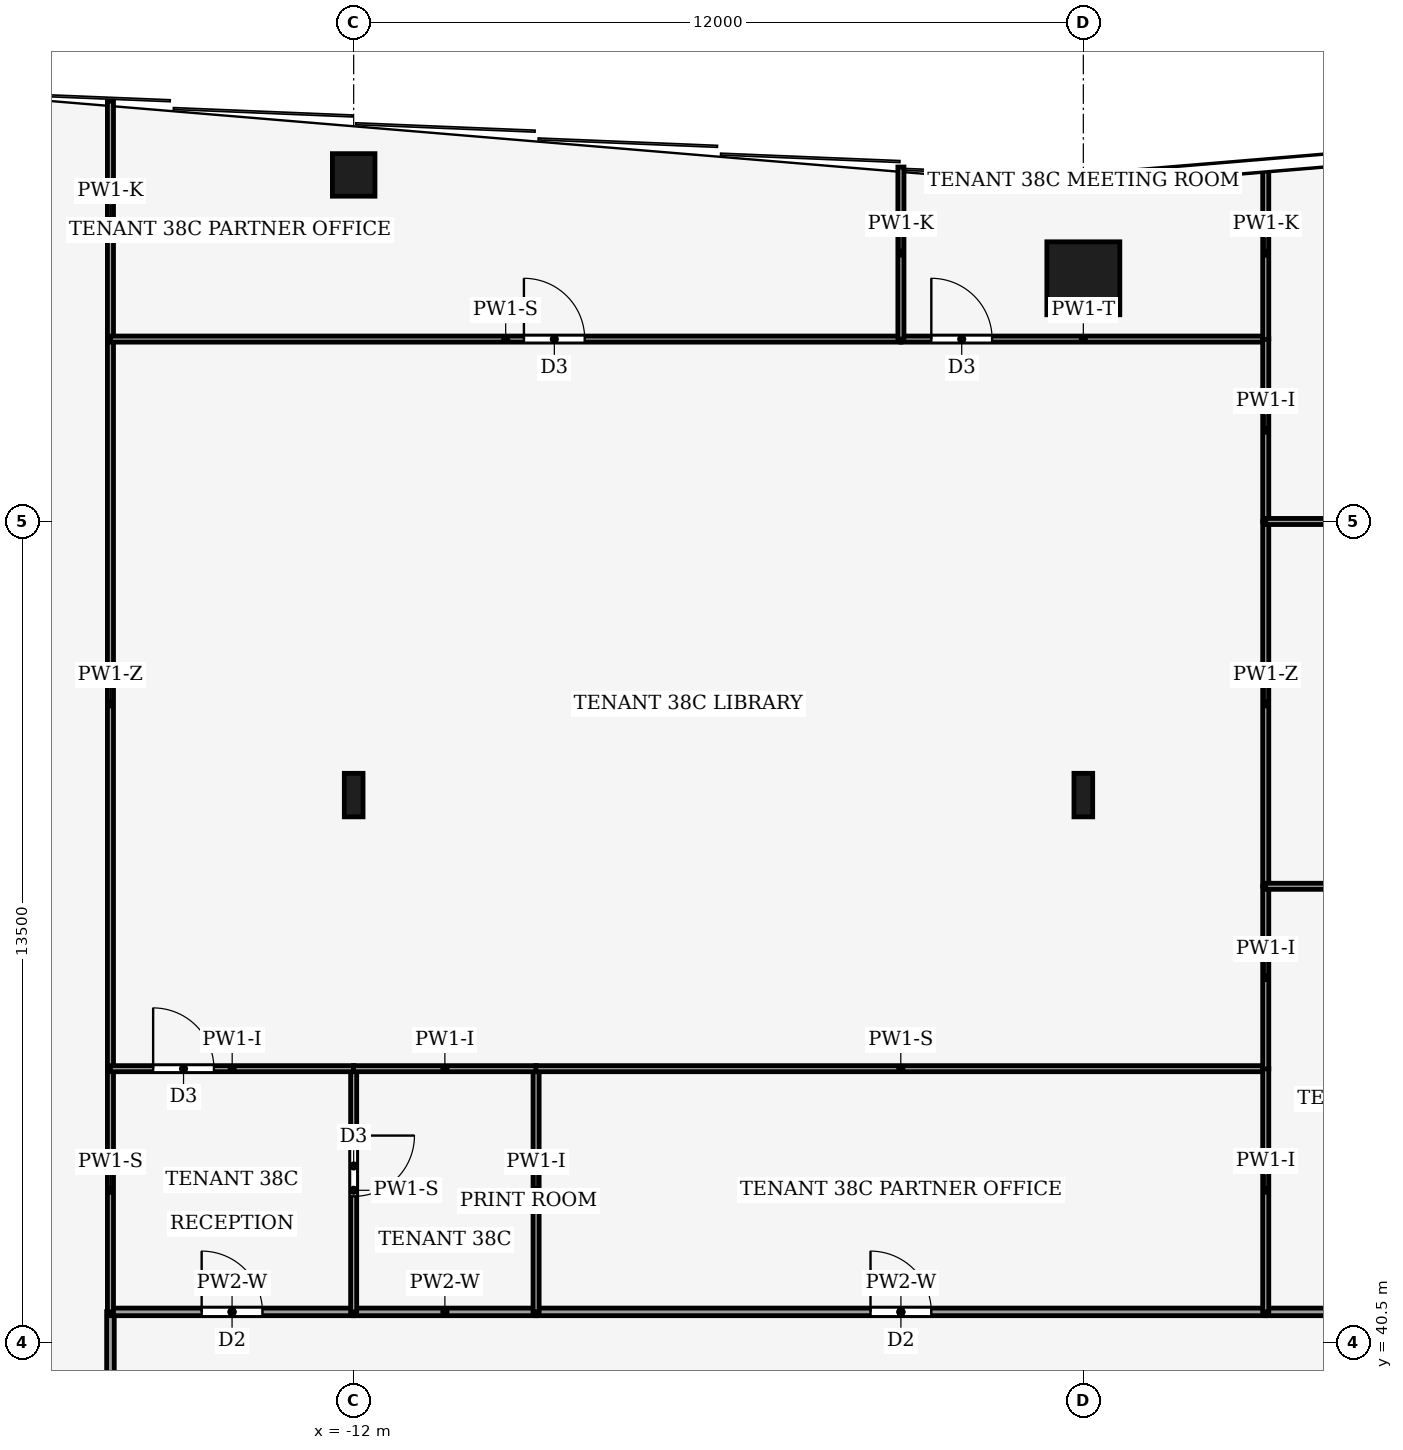
"""IFC4 building model, lengths in metres.
Left out: names, types, materials, properties, quantities, classifications, styles, units other than length and angle.
Written with IfcOpenShell. Run it as: python <this file> out.ifc"""

import sys

from ifc_helpers import new_model, si_unit, direction, frame, frame_2d, origin, origin_2d, place, context, subcontext, project, spatial, rectangle, hollow_rectangle, i_section, extrude, element, fill, save


model = new_model("IFC4")
c1 = context("Model", 3, precision=1e-05, world=origin(), true_north=direction((0.0, 1.0)))
c2 = subcontext(c1, "Body", "Model", "MODEL_VIEW")
j1 = project(units=[si_unit("LENGTHUNIT", "METRE"), si_unit("PLANEANGLEUNIT", "RADIAN")], contexts=[c1])
p1 = place(None, origin())
s1 = spatial("IfcSite", under=j1, at=p1, CompositionType="ELEMENT")
p2 = place(p1, origin())
s2 = spatial("IfcBuilding", under=s1, at=p2, CompositionType="ELEMENT")
p3 = place(p2, frame((0.0, 0.0, 166.0)))
s3 = spatial("IfcBuildingStorey", under=s2, at=p3, CompositionType="ELEMENT", Elevation=166.0)
p4 = place(p3, frame((0.0, 58.0, 0.0), z_axis=(0.0, 0.0, 1.0), x_axis=(1.0, 0.0, 0.0)))
e1 = element("IfcColumn", 1, at=p4, inside=s3, PredefinedType="COLUMN", context=c2, shape_type="SweptSolid", body=[
    extrude(hollow_rectangle(XDim=1.2, YDim=1.2, WallThickness=0.07, at=origin_2d()), origin(), (0.0, 0.0, 1.0), 4.0),
])
p5 = place(p3, frame((-12.0, 59.7, 0.0), z_axis=(0.0, 0.0, 1.0), x_axis=(1.0, 0.0, 0.0)))
e2 = element("IfcColumn", 2, at=p5, inside=s3, PredefinedType="COLUMN", context=c2, shape_type="SweptSolid", body=[
    extrude(hollow_rectangle(XDim=0.7, YDim=0.7, WallThickness=0.03, at=origin_2d()), origin(), (0.0, 0.0, 1.0), 4.0),
])
for number, where, z_axis, x_axis in (
    (3, (-12.0, 49.5, 0.0), (0.0, 0.0, 1.0), (1.0, 0.0, 0.0)),
    (4, (0.0, 49.5, 0.0), (0.0, 0.0, 1.0), (1.0, 0.0, 0.0)),
):
    element("IfcColumn", number, at=place(p3, frame(where, z_axis=z_axis, x_axis=x_axis)), inside=s3, PredefinedType="COLUMN", context=c2, shape_type="SweptSolid", body=[
        extrude(i_section(OverallWidth=0.308, OverallDepth=0.716, WebThickness=0.021, FlangeThickness=0.04, FilletRadius=0.027, at=origin_2d()), origin(), (0.0, 0.0, 1.0), 4.0),
    ])
p6 = place(p3, frame((-16.0, 36.0, 0.0), z_axis=(0.0, 0.0, 1.0), x_axis=(0.0, 1.0, 0.0)))
e5 = element("IfcWall", 5, at=p6, inside=s3, PredefinedType="PARTITIONING", context=c2, shape_type="SweptSolid", body=[
    extrude(rectangle(XDim=5.004, YDim=0.125, at=frame_2d((2.502, 0.0))), origin(), (0.0, 0.0, 1.0), 3.02),
])
p7 = place(p6, frame((2.002, 0.0, 0.0)))
e6 = element("IfcOpeningElement", 6, at=p7, cuts=e5, PredefinedType="OPENING", context=c2, shape_type="SweptSolid", body=[
    extrude(rectangle(XDim=1.0, YDim=2.1, at=frame_2d((0.5, 1.05))), frame((0.0, 0.073, 0.0), z_axis=(0.0, -1.0, 0.0), x_axis=(1.0, 0.0, 0.0)), (0.0, 0.0, 1.0), 0.145),
])
p8 = place(p3, frame((-16.0, 41.0, 0.0), z_axis=(0.0, 0.0, 1.0), x_axis=(1.0, 0.0, 0.0)))
e7 = element("IfcWall", 7, at=p8, inside=s3, PredefinedType="PARTITIONING", context=c2, shape_type="SweptSolid", body=[
    extrude(rectangle(XDim=4.0, YDim=0.125, at=frame_2d((2.0, 0.0))), origin(), (0.0, 0.0, 1.0), 3.32),
])
p9 = place(p8, frame((1.5, 0.0, 0.0)))
e8 = element("IfcOpeningElement", 8, at=p9, cuts=e7, PredefinedType="OPENING", context=c2, shape_type="SweptSolid", body=[
    extrude(rectangle(XDim=1.0, YDim=2.1, at=frame_2d((0.5, 1.05))), frame((0.0, 0.073, 0.0), z_axis=(0.0, -1.0, 0.0), x_axis=(1.0, 0.0, 0.0)), (0.0, 0.0, 1.0), 0.145),
])
p10 = place(p3, frame((-9.0, 41.0, 0.0), z_axis=(0.0, 0.0, 1.0), x_axis=(-1.0, 0.0, 0.0)))
e9 = element("IfcWall", 9, at=p10, inside=s3, PredefinedType="PARTITIONING", context=c2, shape_type="SweptSolid", body=[
    extrude(rectangle(XDim=3.0, YDim=0.125, at=frame_2d((1.5, 0.0))), origin(), (0.0, 0.0, 1.0), 3.32),
])
p11 = place(p3, frame((-9.0, 41.0, 0.0), z_axis=(0.0, 0.0, 1.0), x_axis=(1.0, 0.0, 0.0)))
e10 = element("IfcWall", 10, at=p11, inside=s3, PredefinedType="PARTITIONING", context=c2, shape_type="SweptSolid", body=[
    extrude(rectangle(XDim=12.0, YDim=0.125, at=frame_2d((6.0, 0.0))), origin(), (0.0, 0.0, 1.0), 3.32),
])
p12 = place(p11, frame((5.5, 0.0, 0.0)))
e11 = element("IfcOpeningElement", 11, at=p12, cuts=e10, PredefinedType="OPENING", context=c2, shape_type="SweptSolid", body=[
    extrude(rectangle(XDim=1.0, YDim=2.1, at=frame_2d((0.5, 1.05))), frame((0.0, 0.073, 0.0), z_axis=(0.0, -1.0, 0.0), x_axis=(1.0, 0.0, 0.0)), (0.0, 0.0, 1.0), 0.145),
])
p13 = place(p3, frame((3.0, 41.0, 0.0), z_axis=(0.0, 0.0, 1.0), x_axis=(1.0, 0.0, 0.0)))
e12 = element("IfcWall", 12, at=p13, inside=s3, PredefinedType="PARTITIONING", context=c2, shape_type="SweptSolid", body=[
    extrude(rectangle(XDim=6.0, YDim=0.125, at=frame_2d((3.0, 0.0))), origin(), (0.0, 0.0, 1.0), 3.32),
])
p14 = place(p13, frame((2.5, 0.0, 0.0)))
e13 = element("IfcOpeningElement", 13, at=p14, cuts=e12, PredefinedType="OPENING", context=c2, shape_type="SweptSolid", body=[
    extrude(rectangle(XDim=1.0, YDim=2.1, at=frame_2d((0.5, 1.05))), frame((0.0, 0.073, 0.0), z_axis=(0.0, -1.0, 0.0), x_axis=(1.0, 0.0, 0.0)), (0.0, 0.0, 1.0), 0.145),
])
p15 = place(p3, frame((-16.0, 41.0, 0.0), z_axis=(0.0, 0.0, 1.0), x_axis=(0.0, 1.0, 0.0)))
e14 = element("IfcWall", 14, at=p15, inside=s3, PredefinedType="PARTITIONING", context=c2, shape_type="SweptSolid", body=[
    extrude(rectangle(XDim=4.0, YDim=0.1, at=frame_2d((2.0, 0.0))), origin(), (0.0, 0.0, 1.0), 3.32),
])
p16 = place(p3, frame((-16.0, 45.0, 0.0), z_axis=(0.0, 0.0, 1.0), x_axis=(0.0, 1.0, 0.0)))
e15 = element("IfcWall", 15, at=p16, inside=s3, PredefinedType="PARTITIONING", context=c2, shape_type="SweptSolid", body=[
    extrude(rectangle(XDim=12.0, YDim=0.1, at=frame_2d((6.0, 0.0))), origin(), (0.0, 0.0, 1.0), 3.12),
])
p17 = place(p3, frame((-16.0, 57.0, 0.0), z_axis=(0.0, 0.0, 1.0), x_axis=(0.0, 1.0, 0.0)))
e16 = element("IfcWall", 16, at=p17, inside=s3, PredefinedType="PARTITIONING", context=c2, shape_type="SweptSolid", body=[
    extrude(rectangle(XDim=3.913, YDim=0.1, at=frame_2d((1.957, 0.0))), origin(), (0.0, 0.0, 1.0), 2.92),
])
p18 = place(p3, frame((-12.0, 45.0, 0.0), z_axis=(0.0, 0.0, 1.0), x_axis=(0.0, -1.0, 0.0)))
e17 = element("IfcWall", 17, at=p18, inside=s3, PredefinedType="PARTITIONING", context=c2, shape_type="SweptSolid", body=[
    extrude(rectangle(XDim=4.0, YDim=0.1, at=frame_2d((2.0, 0.0))), origin(), (0.0, 0.0, 1.0), 3.32),
])
p19 = place(p18, frame((1.1, 0.0, 0.0)))
e18 = element("IfcOpeningElement", 18, at=p19, cuts=e17, PredefinedType="OPENING", context=c2, shape_type="SweptSolid", body=[
    extrude(rectangle(XDim=1.0, YDim=2.1, at=frame_2d((0.5, 1.05))), frame((0.0, 0.06, 0.0), z_axis=(0.0, -1.0, 0.0), x_axis=(1.0, 0.0, 0.0)), (0.0, 0.0, 1.0), 0.12),
])
p20 = place(p3, frame((-16.0, 45.0, 0.0), z_axis=(0.0, 0.0, 1.0), x_axis=(1.0, 0.0, 0.0)))
e19 = element("IfcWall", 19, at=p20, inside=s3, PredefinedType="PARTITIONING", context=c2, shape_type="SweptSolid", body=[
    extrude(rectangle(XDim=4.004, YDim=0.1, at=frame_2d((2.002, 0.0))), origin(), (0.0, 0.0, 1.0), 3.75),
])
p21 = place(p20, frame((0.702, 0.0, 0.0)))
e20 = element("IfcOpeningElement", 20, at=p21, cuts=e19, PredefinedType="OPENING", context=c2, shape_type="SweptSolid", body=[
    extrude(rectangle(XDim=1.0, YDim=2.1, at=frame_2d((0.5, 1.05))), frame((0.0, 0.06, 0.0), z_axis=(0.0, -1.0, 0.0), x_axis=(1.0, 0.0, 0.0)), (0.0, 0.0, 1.0), 0.12),
])
p22 = place(p3, frame((-9.0, 41.0, 0.0), z_axis=(0.0, 0.0, 1.0), x_axis=(0.0, 1.0, 0.0)))
e21 = element("IfcWall", 21, at=p22, inside=s3, PredefinedType="PARTITIONING", context=c2, shape_type="SweptSolid", body=[
    extrude(rectangle(XDim=4.0, YDim=0.1, at=frame_2d((2.0, 0.0))), origin(), (0.0, 0.0, 1.0), 3.75),
])
p23 = place(p3, frame((-8.996, 45.0, 0.0), z_axis=(0.0, 0.0, 1.0), x_axis=(-1.0, 0.0, 0.0)))
e22 = element("IfcWall", 22, at=p23, inside=s3, PredefinedType="PARTITIONING", context=c2, shape_type="SweptSolid", body=[
    extrude(rectangle(XDim=3.008, YDim=0.1, at=frame_2d((1.504, 0.0))), origin(), (0.0, 0.0, 1.0), 3.75),
])
p24 = place(p3, frame((3.0, 45.0, 0.0), z_axis=(0.0, 0.0, 1.0), x_axis=(-1.0, 0.0, 0.0)))
e23 = element("IfcWall", 23, at=p24, inside=s3, PredefinedType="PARTITIONING", context=c2, shape_type="SweptSolid", body=[
    extrude(rectangle(XDim=12.004, YDim=0.1, at=frame_2d((6.002, 0.0))), origin(), (0.0, 0.0, 1.0), 3.32),
])
p25 = place(p3, frame((3.0, 41.0, 0.0), z_axis=(0.0, 0.0, 1.0), x_axis=(0.0, 1.0, 0.0)))
e24 = element("IfcWall", 24, at=p25, inside=s3, PredefinedType="PARTITIONING", context=c2, shape_type="SweptSolid", body=[
    extrude(rectangle(XDim=4.004, YDim=0.1, at=frame_2d((2.002, 0.0))), origin(), (0.0, 0.0, 1.0), 3.75),
])
p26 = place(p3, frame((-16.0, 57.0, 0.0), z_axis=(0.0, 0.0, 1.0), x_axis=(1.0, 0.0, 0.0)))
e25 = element("IfcWall", 25, at=p26, inside=s3, PredefinedType="PARTITIONING", context=c2, shape_type="SweptSolid", body=[
    extrude(rectangle(XDim=13.0, YDim=0.1, at=frame_2d((6.5, 0.0))), origin(), (0.0, 0.0, 1.0), 3.32),
])
p27 = place(p26, frame((6.8, 0.0, 0.0)))
e26 = element("IfcOpeningElement", 26, at=p27, cuts=e25, PredefinedType="OPENING", context=c2, shape_type="SweptSolid", body=[
    extrude(rectangle(XDim=1.0, YDim=2.1, at=frame_2d((0.5, 1.05))), frame((0.0, 0.06, 0.0), z_axis=(0.0, -1.0, 0.0), x_axis=(1.0, 0.0, 0.0)), (0.0, 0.0, 1.0), 0.12),
])
p28 = place(p3, frame((-3.0, 57.0, 0.0), z_axis=(0.0, 0.0, 1.0), x_axis=(1.0, 0.0, 0.0)))
e27 = element("IfcWall", 27, at=p28, inside=s3, PredefinedType="PARTITIONING", context=c2, shape_type="SweptSolid", body=[
    extrude(rectangle(XDim=6.0, YDim=0.1, at=frame_2d((3.0, 0.0))), origin(), (0.0, 0.0, 1.0), 3.36),
])
p29 = place(p28, frame((0.5, 0.0, 0.0)))
e28 = element("IfcOpeningElement", 28, at=p29, cuts=e27, PredefinedType="OPENING", context=c2, shape_type="SweptSolid", body=[
    extrude(rectangle(XDim=1.0, YDim=2.1, at=frame_2d((0.5, 1.05))), frame((0.0, 0.06, 0.0), z_axis=(0.0, -1.0, 0.0), x_axis=(1.0, 0.0, 0.0)), (0.0, 0.0, 1.0), 0.12),
])
p30 = place(p3, frame((3.0, 44.996, 0.0), z_axis=(0.0, 0.0, 1.0), x_axis=(0.0, 1.0, 0.0)))
e29 = element("IfcWall", 29, at=p30, inside=s3, PredefinedType="PARTITIONING", context=c2, shape_type="SweptSolid", body=[
    extrude(rectangle(XDim=3.004, YDim=0.1, at=frame_2d((1.502, 0.0))), origin(), (0.0, 0.0, 1.0), 3.75),
])
p31 = place(p3, frame((3.0, 48.0, 0.0), z_axis=(0.0, 0.0, 1.0), x_axis=(0.0, 1.0, 0.0)))
e30 = element("IfcWall", 30, at=p31, inside=s3, PredefinedType="PARTITIONING", context=c2, shape_type="SweptSolid", body=[
    extrude(rectangle(XDim=6.0, YDim=0.1, at=frame_2d((3.0, 0.0))), origin(), (0.0, 0.0, 1.0), 3.12),
])
p32 = place(p3, frame((3.0, 54.0, 0.0), z_axis=(0.0, 0.0, 1.0), x_axis=(0.0, 1.0, 0.0)))
e31 = element("IfcWall", 31, at=p32, inside=s3, PredefinedType="PARTITIONING", context=c2, shape_type="SweptSolid", body=[
    extrude(rectangle(XDim=3.004, YDim=0.1, at=frame_2d((1.502, 0.0))), origin(), (0.0, 0.0, 1.0), 3.75),
])
p33 = place(p3, frame((-3.0, 57.0, 0.0), z_axis=(0.0, 0.0, 1.0), x_axis=(0.0, 1.0, 0.0)))
e32 = element("IfcWall", 32, at=p33, inside=s3, PredefinedType="PARTITIONING", context=c2, shape_type="SweptSolid", body=[
    extrude(rectangle(XDim=2.83, YDim=0.1, at=frame_2d((1.415, 0.0))), origin(), (0.0, 0.0, 1.0), 2.92),
])
p34 = place(p3, frame((3.0, 56.996, 0.0), z_axis=(0.0, 0.0, 1.0), x_axis=(0.0, 1.0, 0.0)))
e33 = element("IfcWall", 33, at=p34, inside=s3, PredefinedType="PARTITIONING", context=c2, shape_type="SweptSolid", body=[
    extrude(rectangle(XDim=2.834, YDim=0.1, at=frame_2d((1.417, 0.0))), origin(), (0.0, 0.0, 1.0), 2.92),
])
p35 = place(p3, frame((3.0, 48.0, 0.0), z_axis=(0.0, 0.0, 1.0), x_axis=(1.0, 0.0, 0.0)))
e34 = element("IfcWall", 34, at=p35, inside=s3, PredefinedType="PARTITIONING", context=c2, shape_type="SweptSolid", body=[
    extrude(rectangle(XDim=6.004, YDim=0.1, at=frame_2d((3.002, 0.0))), origin(), (0.0, 0.0, 1.0), 3.32),
])
p36 = place(p35, frame((2.502, 0.0, 0.0)))
e35 = element("IfcOpeningElement", 35, at=p36, cuts=e34, PredefinedType="OPENING", context=c2, shape_type="SweptSolid", body=[
    extrude(rectangle(XDim=1.0, YDim=2.1, at=frame_2d((0.5, 1.05))), frame((0.0, 0.06, 0.0), z_axis=(0.0, -1.0, 0.0), x_axis=(1.0, 0.0, 0.0)), (0.0, 0.0, 1.0), 0.12),
])
p37 = place(p3, frame((3.0, 54.0, 0.0), z_axis=(0.0, 0.0, 1.0), x_axis=(1.0, 0.0, 0.0)))
e36 = element("IfcWall", 36, at=p37, inside=s3, PredefinedType="PARTITIONING", context=c2, shape_type="SweptSolid", body=[
    extrude(rectangle(XDim=9.0, YDim=0.1, at=frame_2d((4.5, 0.0))), origin(), (0.0, 0.0, 1.0), 3.32),
])
p38 = place(p37, frame((4.0, 0.0, 0.0)))
e37 = element("IfcOpeningElement", 37, at=p38, cuts=e36, PredefinedType="OPENING", context=c2, shape_type="SweptSolid", body=[
    extrude(rectangle(XDim=1.0, YDim=2.1, at=frame_2d((0.5, 1.05))), frame((0.0, 0.06, 0.0), z_axis=(0.0, -1.0, 0.0), x_axis=(1.0, 0.0, 0.0)), (0.0, 0.0, 1.0), 0.12),
])
p39 = place(p9, origin())
e38 = element("IfcDoor", 38, at=p39, inside=s3, OperationType="SINGLE_SWING_LEFT", PredefinedType="DOOR", context=c2, shape_type="SweptSolid", body=[
    extrude(rectangle(XDim=1.0, YDim=2.1, at=frame_2d((0.5, 1.05))), frame((0.0, 0.025, 0.0), z_axis=(0.0, -1.0, 0.0), x_axis=(1.0, 0.0, 0.0)), (0.0, 0.0, 1.0), 0.05),
])
fill(e8, e38)
p40 = place(p12, origin())
e39 = element("IfcDoor", 39, at=p40, inside=s3, OperationType="SINGLE_SWING_RIGHT", PredefinedType="DOOR", context=c2, shape_type="SweptSolid", body=[
    extrude(rectangle(XDim=1.0, YDim=2.1, at=frame_2d((0.5, 1.05))), frame((0.0, 0.025, 0.0), z_axis=(0.0, -1.0, 0.0), x_axis=(1.0, 0.0, 0.0)), (0.0, 0.0, 1.0), 0.05),
])
fill(e11, e39)
p41 = place(p19, origin())
e40 = element("IfcDoor", 40, at=p41, inside=s3, OperationType="SINGLE_SWING_LEFT", PredefinedType="DOOR", context=c2, shape_type="SweptSolid", body=[
    extrude(rectangle(XDim=1.0, YDim=2.1, at=frame_2d((0.5, 1.05))), frame((0.0, 0.025, 0.0), z_axis=(0.0, -1.0, 0.0), x_axis=(1.0, 0.0, 0.0)), (0.0, 0.0, 1.0), 0.05),
])
fill(e18, e40)
p42 = place(p21, origin())
e41 = element("IfcDoor", 41, at=p42, inside=s3, OperationType="SINGLE_SWING_LEFT", PredefinedType="DOOR", context=c2, shape_type="SweptSolid", body=[
    extrude(rectangle(XDim=1.0, YDim=2.1, at=frame_2d((0.5, 1.05))), frame((0.0, 0.025, 0.0), z_axis=(0.0, -1.0, 0.0), x_axis=(1.0, 0.0, 0.0)), (0.0, 0.0, 1.0), 0.05),
])
fill(e20, e41)
p43 = place(p27, origin())
e42 = element("IfcDoor", 42, at=p43, inside=s3, OperationType="SINGLE_SWING_RIGHT", PredefinedType="DOOR", context=c2, shape_type="SweptSolid", body=[
    extrude(rectangle(XDim=1.0, YDim=2.1, at=frame_2d((0.5, 1.05))), frame((0.0, 0.025, 0.0), z_axis=(0.0, -1.0, 0.0), x_axis=(1.0, 0.0, 0.0)), (0.0, 0.0, 1.0), 0.05),
])
fill(e26, e42)
p44 = place(p29, origin())
e43 = element("IfcDoor", 43, at=p44, inside=s3, OperationType="SINGLE_SWING_LEFT", PredefinedType="DOOR", context=c2, shape_type="SweptSolid", body=[
    extrude(rectangle(XDim=1.0, YDim=2.1, at=frame_2d((0.5, 1.05))), frame((0.0, 0.025, 0.0), z_axis=(0.0, -1.0, 0.0), x_axis=(1.0, 0.0, 0.0)), (0.0, 0.0, 1.0), 0.05),
])
fill(e28, e43)
save(model, sys.argv[1])
